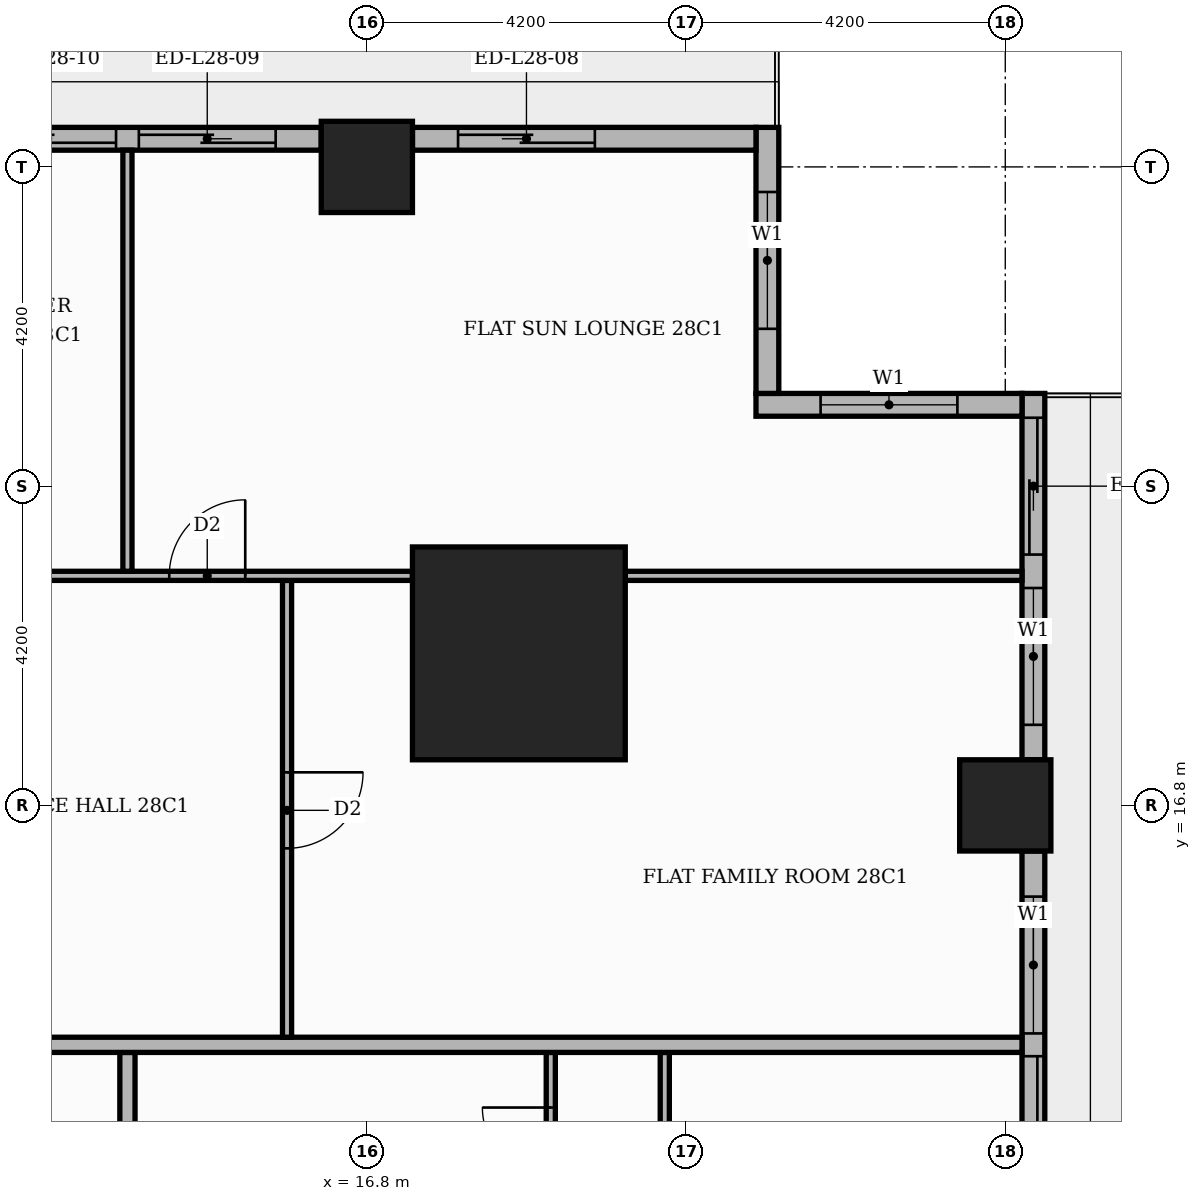
"""IFC4 building model, lengths in metres.
Left out: names, types, materials, properties, quantities, classifications, styles, units other than length and angle.
Written with IfcOpenShell. Run it as: python <this file> out.ifc"""

import sys

from ifc_helpers import new_model, si_unit, direction, frame, frame_2d, origin, origin_2d, place, context, subcontext, project, spatial, rectangle, extrude, element, fill, save


model = new_model("IFC4")
c1 = context("Model", 3, precision=1e-05, world=origin(), true_north=direction((0.0, 1.0)))
c2 = subcontext(c1, "Body", "Model", "MODEL_VIEW")
j1 = project(units=[si_unit("LENGTHUNIT", "METRE"), si_unit("PLANEANGLEUNIT", "RADIAN")], contexts=[c1])
p1 = place(None, origin())
s1 = spatial("IfcSite", under=j1, at=p1, CompositionType="ELEMENT")
p2 = place(p1, origin())
s2 = spatial("IfcBuilding", under=s1, at=p2, CompositionType="ELEMENT")
p3 = place(p2, frame((0.0, 0.0, 118.2)))
s3 = spatial("IfcBuildingStorey", under=s2, at=p3, CompositionType="ELEMENT", Elevation=118.2)
p4 = place(p3, frame((18.8, 18.8, 0.0), z_axis=(0.0, 0.0, 1.0), x_axis=(1.0, 0.0, 0.0)))
e1 = element("IfcColumn", 1, at=p4, inside=s3, PredefinedType="COLUMN", context=c2, shape_type="SweptSolid", body=[
    extrude(rectangle(XDim=2.8, YDim=2.8, at=origin_2d()), origin(), (0.0, 0.0, 1.0), 3.9),
])
for number, where, z_axis, x_axis in (
    (2, (25.2, 16.8, 0.0), (0.0, 0.0, 1.0), (1.0, 0.0, 0.0)),
    (3, (16.8, 25.2, 0.0), (0.0, 0.0, 1.0), (1.0, 0.0, 0.0)),
):
    element("IfcColumn", number, at=place(p3, frame(where, z_axis=z_axis, x_axis=x_axis)), inside=s3, PredefinedType="COLUMN", context=c2, shape_type="SweptSolid", body=[
        extrude(rectangle(XDim=1.2, YDim=1.2, at=origin_2d()), origin(), (0.0, 0.0, 1.0), 3.9),
    ])
p5 = place(p3, frame((25.57, 9.0, 0.0), z_axis=(0.0, 0.0, 1.0), x_axis=(0.0, 1.0, 0.0)))
e4 = element("IfcWall", 4, at=p5, inside=s3, PredefinedType="STANDARD", context=c2, shape_type="SweptSolid", body=[
    extrude(rectangle(XDim=7.2, YDim=0.3, at=frame_2d((3.6, 0.0))), origin(), (0.0, 0.0, 1.0), 3.48),
])
p6 = place(p5, frame((0.6, 0.0, 0.0)))
e5 = element("IfcOpeningElement", 5, at=p6, cuts=e4, PredefinedType="OPENING", context=c2, shape_type="SweptSolid", body=[
    extrude(rectangle(XDim=3.9, YDim=2.4, at=frame_2d((1.95, 1.2))), frame((0.0, 0.16, 0.0), z_axis=(0.0, -1.0, 0.0), x_axis=(1.0, 0.0, 0.0)), (0.0, 0.0, 1.0), 0.32),
])
p7 = place(p5, frame((4.8, 0.0, 0.9)))
e6 = element("IfcOpeningElement", 6, at=p7, cuts=e4, PredefinedType="OPENING", context=c2, shape_type="SweptSolid", body=[
    extrude(rectangle(XDim=1.8, YDim=2.1, at=frame_2d((0.9, 1.05))), frame((0.0, 0.16, 0.0), z_axis=(0.0, -1.0, 0.0), x_axis=(1.0, 0.0, 0.0)), (0.0, 0.0, 1.0), 0.32),
])
p8 = place(p3, frame((25.57, 17.4, 0.0), z_axis=(0.0, 0.0, 1.0), x_axis=(0.0, 1.0, 0.0)))
e7 = element("IfcWall", 7, at=p8, inside=s3, PredefinedType="STANDARD", context=c2, shape_type="SweptSolid", body=[
    extrude(rectangle(XDim=4.82, YDim=0.3, at=frame_2d((2.41, 0.0))), origin(), (0.0, 0.0, 1.0), 3.48),
])
p9 = place(p8, frame((2.7, 0.0, 0.0)))
e8 = element("IfcOpeningElement", 8, at=p9, cuts=e7, PredefinedType="OPENING", context=c2, shape_type="SweptSolid", body=[
    extrude(rectangle(XDim=1.8, YDim=2.4, at=frame_2d((0.9, 1.2))), frame((0.0, 0.16, 0.0), z_axis=(0.0, -1.0, 0.0), x_axis=(1.0, 0.0, 0.0)), (0.0, 0.0, 1.0), 0.32),
])
p10 = place(p8, frame((0.46, 0.0, 0.9)))
e9 = element("IfcOpeningElement", 9, at=p10, cuts=e7, PredefinedType="OPENING", context=c2, shape_type="SweptSolid", body=[
    extrude(rectangle(XDim=1.8, YDim=2.1, at=frame_2d((0.9, 1.05))), frame((0.0, 0.16, 0.0), z_axis=(0.0, -1.0, 0.0), x_axis=(1.0, 0.0, 0.0)), (0.0, 0.0, 1.0), 0.32),
])
p11 = place(p3, frame((25.42, 22.07, 0.0), z_axis=(0.0, 0.0, 1.0), x_axis=(-1.0, 0.0, 0.0)))
e10 = element("IfcWall", 10, at=p11, inside=s3, PredefinedType="STANDARD", context=c2, shape_type="SweptSolid", body=[
    extrude(rectangle(XDim=3.5, YDim=0.3, at=frame_2d((1.75, 0.0))), origin(), (0.0, 0.0, 1.0), 3.48),
])
p12 = place(p11, frame((0.85, 0.0, 0.9)))
e11 = element("IfcOpeningElement", 11, at=p12, cuts=e10, PredefinedType="OPENING", context=c2, shape_type="SweptSolid", body=[
    extrude(rectangle(XDim=1.8, YDim=2.1, at=frame_2d((0.9, 1.05))), frame((0.0, 0.16, 0.0), z_axis=(0.0, -1.0, 0.0), x_axis=(1.0, 0.0, 0.0)), (0.0, 0.0, 1.0), 0.32),
])
p13 = place(p3, frame((22.07, 22.22, 0.0), z_axis=(0.0, 0.0, 1.0), x_axis=(0.0, 1.0, 0.0)))
e12 = element("IfcWall", 12, at=p13, inside=s3, PredefinedType="STANDARD", context=c2, shape_type="SweptSolid", body=[
    extrude(rectangle(XDim=3.5, YDim=0.3, at=frame_2d((1.75, 0.0))), origin(), (0.0, 0.0, 1.0), 3.48),
])
p14 = place(p13, frame((0.85, 0.0, 0.9)))
e13 = element("IfcOpeningElement", 13, at=p14, cuts=e12, PredefinedType="OPENING", context=c2, shape_type="SweptSolid", body=[
    extrude(rectangle(XDim=1.8, YDim=2.1, at=frame_2d((0.9, 1.05))), frame((0.0, 0.16, 0.0), z_axis=(0.0, -1.0, 0.0), x_axis=(1.0, 0.0, 0.0)), (0.0, 0.0, 1.0), 0.32),
])
p15 = place(p3, frame((21.92, 25.57, 0.0), z_axis=(0.0, 0.0, 1.0), x_axis=(-1.0, 0.0, 0.0)))
e14 = element("IfcWall", 14, at=p15, inside=s3, PredefinedType="STANDARD", context=c2, shape_type="SweptSolid", body=[
    extrude(rectangle(XDim=4.52, YDim=0.3, at=frame_2d((2.26, 0.0))), origin(), (0.0, 0.0, 1.0), 3.48),
])
p16 = place(p15, frame((2.12, 0.0, 0.0)))
e15 = element("IfcOpeningElement", 15, at=p16, cuts=e14, PredefinedType="OPENING", context=c2, shape_type="SweptSolid", body=[
    extrude(rectangle(XDim=1.8, YDim=2.4, at=frame_2d((0.9, 1.2))), frame((0.0, 0.16, 0.0), z_axis=(0.0, -1.0, 0.0), x_axis=(1.0, 0.0, 0.0)), (0.0, 0.0, 1.0), 0.32),
])
p17 = place(p3, frame((16.2, 25.57, 0.0), z_axis=(0.0, 0.0, 1.0), x_axis=(-1.0, 0.0, 0.0)))
e16 = element("IfcWall", 16, at=p17, inside=s3, PredefinedType="STANDARD", context=c2, shape_type="SweptSolid", body=[
    extrude(rectangle(XDim=7.2, YDim=0.3, at=frame_2d((3.6, 0.0))), origin(), (0.0, 0.0, 1.0), 3.48),
])
p18 = place(p17, frame((0.6, 0.0, 0.0)))
e17 = element("IfcOpeningElement", 17, at=p18, cuts=e16, PredefinedType="OPENING", context=c2, shape_type="SweptSolid", body=[
    extrude(rectangle(XDim=1.8, YDim=2.4, at=frame_2d((0.9, 1.2))), frame((0.0, 0.16, 0.0), z_axis=(0.0, -1.0, 0.0), x_axis=(1.0, 0.0, 0.0)), (0.0, 0.0, 1.0), 0.32),
])
p19 = place(p17, frame((2.7, 0.0, 0.0)))
e18 = element("IfcOpeningElement", 18, at=p19, cuts=e16, PredefinedType="OPENING", context=c2, shape_type="SweptSolid", body=[
    extrude(rectangle(XDim=1.8, YDim=2.4, at=frame_2d((0.9, 1.2))), frame((0.0, 0.16, 0.0), z_axis=(0.0, -1.0, 0.0), x_axis=(1.0, 0.0, 0.0)), (0.0, 0.0, 1.0), 0.32),
])
p20 = place(p17, frame((4.8, 0.0, 0.9)))
e19 = element("IfcOpeningElement", 19, at=p20, cuts=e16, PredefinedType="OPENING", context=c2, shape_type="SweptSolid", body=[
    extrude(rectangle(XDim=1.8, YDim=2.1, at=frame_2d((0.9, 1.05))), frame((0.0, 0.16, 0.0), z_axis=(0.0, -1.0, 0.0), x_axis=(1.0, 0.0, 0.0)), (0.0, 0.0, 1.0), 0.32),
])
p21 = place(p3, frame((13.65, -5.15, 0.0), z_axis=(0.0, 0.0, 1.0), x_axis=(0.0, 1.0, 0.0)))
e20 = element("IfcWall", 20, at=p21, inside=s3, PredefinedType="PARTITIONING", context=c2, shape_type="SweptSolid", body=[
    extrude(rectangle(XDim=18.7, YDim=0.2, at=frame_2d((9.35, 0.0))), origin(), (0.0, 0.0, 1.0), 3.48),
])
p22 = place(p21, frame((1.45, 0.0, 0.0)))
e21 = element("IfcOpeningElement", 21, at=p22, cuts=e20, PredefinedType="OPENING", context=c2, shape_type="SweptSolid", body=[
    extrude(rectangle(XDim=1.1, YDim=2.4, at=frame_2d((0.55, 1.2))), frame((0.0, 0.11, 0.0), z_axis=(0.0, -1.0, 0.0), x_axis=(1.0, 0.0, 0.0)), (0.0, 0.0, 1.0), 0.22),
])
p23 = place(p3, frame((20.72, 7.41, 0.0), z_axis=(0.0, 0.0, 1.0), x_axis=(0.0, 1.0, 0.0)))
e22 = element("IfcWall", 22, at=p23, inside=s3, PredefinedType="PARTITIONING", context=c2, shape_type="SweptSolid", body=[
    extrude(rectangle(XDim=6.14, YDim=0.12, at=frame_2d((3.07, 0.0))), origin(), (0.0, 0.0, 1.0), 3.48),
])
p24 = place(p23, frame((2.59, 0.0, 0.0)))
e23 = element("IfcOpeningElement", 23, at=p24, cuts=e22, PredefinedType="OPENING", context=c2, shape_type="SweptSolid", body=[
    extrude(rectangle(XDim=1.0, YDim=2.1, at=frame_2d((0.5, 1.05))), frame((0.0, 0.07, 0.0), z_axis=(0.0, -1.0, 0.0), x_axis=(1.0, 0.0, 0.0)), (0.0, 0.0, 1.0), 0.14),
])
p25 = place(p3, frame((19.22, 11.16, 0.0), z_axis=(0.0, 0.0, 1.0), x_axis=(0.0, 1.0, 0.0)))
e24 = element("IfcWall", 24, at=p25, inside=s3, PredefinedType="PARTITIONING", context=c2, shape_type="SweptSolid", body=[
    extrude(rectangle(XDim=2.39, YDim=0.12, at=frame_2d((1.195, 0.0))), origin(), (0.0, 0.0, 1.0), 3.48),
])
p26 = place(p25, frame((0.765, 0.0, 0.0)))
e25 = element("IfcOpeningElement", 25, at=p26, cuts=e24, PredefinedType="OPENING", context=c2, shape_type="SweptSolid", body=[
    extrude(rectangle(XDim=0.9, YDim=2.1, at=frame_2d((0.45, 1.05))), frame((0.0, 0.07, 0.0), z_axis=(0.0, -1.0, 0.0), x_axis=(1.0, 0.0, 0.0)), (0.0, 0.0, 1.0), 0.14),
])
p27 = place(p3, frame((-13.65, 13.65, 0.0), z_axis=(0.0, 0.0, 1.0), x_axis=(1.0, 0.0, 0.0)))
e26 = element("IfcWall", 26, at=p27, inside=s3, PredefinedType="PARTITIONING", context=c2, shape_type="SweptSolid", body=[
    extrude(rectangle(XDim=39.07, YDim=0.2, at=frame_2d((19.535, 0.0))), origin(), (0.0, 0.0, 1.0), 3.48),
])
p28 = place(p27, frame((24.65, 0.0, 0.0)))
e27 = element("IfcOpeningElement", 27, at=p28, cuts=e26, PredefinedType="OPENING", context=c2, shape_type="SweptSolid", body=[
    extrude(rectangle(XDim=1.1, YDim=2.4, at=frame_2d((0.55, 1.2))), frame((0.0, 0.11, 0.0), z_axis=(0.0, -1.0, 0.0), x_axis=(1.0, 0.0, 0.0)), (0.0, 0.0, 1.0), 0.22),
])
p29 = place(p27, frame((14.15, 0.0, 0.0)))
e28 = element("IfcOpeningElement", 28, at=p29, cuts=e26, PredefinedType="OPENING", context=c2, shape_type="SweptSolid", body=[
    extrude(rectangle(XDim=1.1, YDim=2.4, at=frame_2d((0.55, 1.2))), frame((0.0, 0.11, 0.0), z_axis=(0.0, -1.0, 0.0), x_axis=(1.0, 0.0, 0.0)), (0.0, 0.0, 1.0), 0.22),
])
p30 = place(p3, frame((15.75, 13.75, 0.0), z_axis=(0.0, 0.0, 1.0), x_axis=(0.0, 1.0, 0.0)))
e29 = element("IfcWall", 29, at=p30, inside=s3, PredefinedType="PARTITIONING", context=c2, shape_type="SweptSolid", body=[
    extrude(rectangle(XDim=6.01, YDim=0.12, at=frame_2d((3.005, 0.0))), origin(), (0.0, 0.0, 1.0), 3.48),
])
p31 = place(p30, frame((2.485, 0.0, 0.0)))
e30 = element("IfcOpeningElement", 30, at=p31, cuts=e29, PredefinedType="OPENING", context=c2, shape_type="SweptSolid", body=[
    extrude(rectangle(XDim=1.0, YDim=2.1, at=frame_2d((0.5, 1.05))), frame((0.0, 0.07, 0.0), z_axis=(0.0, -1.0, 0.0), x_axis=(1.0, 0.0, 0.0)), (0.0, 0.0, 1.0), 0.14),
])
p32 = place(p3, frame((5.35, 19.82, 0.0), z_axis=(0.0, 0.0, 1.0), x_axis=(1.0, 0.0, 0.0)))
e31 = element("IfcWall", 31, at=p32, inside=s3, PredefinedType="PARTITIONING", context=c2, shape_type="SweptSolid", body=[
    extrude(rectangle(XDim=12.05, YDim=0.12, at=frame_2d((6.025, 0.0))), origin(), (0.0, 0.0, 1.0), 3.48),
])
p33 = place(p32, frame((8.85, 0.0, 0.0)))
e32 = element("IfcOpeningElement", 32, at=p33, cuts=e31, PredefinedType="OPENING", context=c2, shape_type="SweptSolid", body=[
    extrude(rectangle(XDim=1.0, YDim=2.1, at=frame_2d((0.5, 1.05))), frame((0.0, 0.07, 0.0), z_axis=(0.0, -1.0, 0.0), x_axis=(1.0, 0.0, 0.0)), (0.0, 0.0, 1.0), 0.14),
])
p34 = place(p32, frame((5.75, 0.0, 0.0)))
e33 = element("IfcOpeningElement", 33, at=p34, cuts=e31, PredefinedType="OPENING", context=c2, shape_type="SweptSolid", body=[
    extrude(rectangle(XDim=0.9, YDim=2.1, at=frame_2d((0.45, 1.05))), frame((0.0, 0.07, 0.0), z_axis=(0.0, -1.0, 0.0), x_axis=(1.0, 0.0, 0.0)), (0.0, 0.0, 1.0), 0.14),
])
p35 = place(p3, frame((20.2, 19.82, 0.0), z_axis=(0.0, 0.0, 1.0), x_axis=(1.0, 0.0, 0.0)))
e34 = element("IfcWall", 34, at=p35, inside=s3, PredefinedType="PARTITIONING", context=c2, shape_type="SweptSolid", body=[
    extrude(rectangle(XDim=5.22, YDim=0.12, at=frame_2d((2.61, 0.0))), origin(), (0.0, 0.0, 1.0), 3.48),
])
p36 = place(p3, frame((13.65, 19.88, 0.0), z_axis=(0.0, 0.0, 1.0), x_axis=(0.0, 1.0, 0.0)))
e35 = element("IfcWall", 35, at=p36, inside=s3, PredefinedType="PARTITIONING", context=c2, shape_type="SweptSolid", body=[
    extrude(rectangle(XDim=5.54, YDim=0.12, at=frame_2d((2.77, 0.0))), origin(), (0.0, 0.0, 1.0), 3.48),
])
p37 = place(p6, origin())
e36 = element("IfcDoor", 36, at=p37, inside=s3, OperationType="SLIDING_TO_LEFT", PredefinedType="DOOR", context=c2, shape_type="SweptSolid", body=[
    extrude(rectangle(XDim=3.9, YDim=2.4, at=frame_2d((1.95, 1.2))), frame((0.0, 0.025, 0.0), z_axis=(0.0, -1.0, 0.0), x_axis=(1.0, 0.0, 0.0)), (0.0, 0.0, 1.0), 0.05),
])
fill(e5, e36)
p38 = place(p7, origin())
e37 = element("IfcWindow", 37, at=p38, inside=s3, PartitioningType="SINGLE_PANEL", PredefinedType="WINDOW", context=c2, shape_type="SweptSolid", body=[
    extrude(rectangle(XDim=1.8, YDim=2.1, at=frame_2d((0.9, 1.05))), frame((0.0, 0.03, 0.0), z_axis=(0.0, -1.0, 0.0), x_axis=(1.0, 0.0, 0.0)), (0.0, 0.0, 1.0), 0.06),
])
fill(e6, e37)
p39 = place(p9, origin())
e38 = element("IfcDoor", 38, at=p39, inside=s3, OperationType="SLIDING_TO_LEFT", PredefinedType="DOOR", context=c2, shape_type="SweptSolid", body=[
    extrude(rectangle(XDim=1.8, YDim=2.4, at=frame_2d((0.9, 1.2))), frame((0.0, 0.025, 0.0), z_axis=(0.0, -1.0, 0.0), x_axis=(1.0, 0.0, 0.0)), (0.0, 0.0, 1.0), 0.05),
])
fill(e8, e38)
p40 = place(p10, origin())
e39 = element("IfcWindow", 39, at=p40, inside=s3, PartitioningType="SINGLE_PANEL", PredefinedType="WINDOW", context=c2, shape_type="SweptSolid", body=[
    extrude(rectangle(XDim=1.8, YDim=2.1, at=frame_2d((0.9, 1.05))), frame((0.0, 0.03, 0.0), z_axis=(0.0, -1.0, 0.0), x_axis=(1.0, 0.0, 0.0)), (0.0, 0.0, 1.0), 0.06),
])
fill(e9, e39)
p41 = place(p12, origin())
e40 = element("IfcWindow", 40, at=p41, inside=s3, PartitioningType="SINGLE_PANEL", PredefinedType="WINDOW", context=c2, shape_type="SweptSolid", body=[
    extrude(rectangle(XDim=1.8, YDim=2.1, at=frame_2d((0.9, 1.05))), frame((0.0, 0.03, 0.0), z_axis=(0.0, -1.0, 0.0), x_axis=(1.0, 0.0, 0.0)), (0.0, 0.0, 1.0), 0.06),
])
fill(e11, e40)
p42 = place(p14, origin())
e41 = element("IfcWindow", 41, at=p42, inside=s3, PartitioningType="SINGLE_PANEL", PredefinedType="WINDOW", context=c2, shape_type="SweptSolid", body=[
    extrude(rectangle(XDim=1.8, YDim=2.1, at=frame_2d((0.9, 1.05))), frame((0.0, 0.03, 0.0), z_axis=(0.0, -1.0, 0.0), x_axis=(1.0, 0.0, 0.0)), (0.0, 0.0, 1.0), 0.06),
])
fill(e13, e41)
p43 = place(p16, origin())
e42 = element("IfcDoor", 42, at=p43, inside=s3, OperationType="SLIDING_TO_RIGHT", PredefinedType="DOOR", context=c2, shape_type="SweptSolid", body=[
    extrude(rectangle(XDim=1.8, YDim=2.4, at=frame_2d((0.9, 1.2))), frame((0.0, 0.025, 0.0), z_axis=(0.0, -1.0, 0.0), x_axis=(1.0, 0.0, 0.0)), (0.0, 0.0, 1.0), 0.05),
])
fill(e15, e42)
p44 = place(p18, origin())
e43 = element("IfcDoor", 43, at=p44, inside=s3, OperationType="SLIDING_TO_LEFT", PredefinedType="DOOR", context=c2, shape_type="SweptSolid", body=[
    extrude(rectangle(XDim=1.8, YDim=2.4, at=frame_2d((0.9, 1.2))), frame((0.0, 0.025, 0.0), z_axis=(0.0, -1.0, 0.0), x_axis=(1.0, 0.0, 0.0)), (0.0, 0.0, 1.0), 0.05),
])
fill(e17, e43)
p45 = place(p19, origin())
e44 = element("IfcDoor", 44, at=p45, inside=s3, OperationType="SLIDING_TO_RIGHT", PredefinedType="DOOR", context=c2, shape_type="SweptSolid", body=[
    extrude(rectangle(XDim=1.8, YDim=2.4, at=frame_2d((0.9, 1.2))), frame((0.0, 0.025, 0.0), z_axis=(0.0, -1.0, 0.0), x_axis=(1.0, 0.0, 0.0)), (0.0, 0.0, 1.0), 0.05),
])
fill(e18, e44)
p46 = place(p26, origin())
e45 = element("IfcDoor", 45, at=p46, inside=s3, OperationType="SINGLE_SWING_RIGHT", PredefinedType="DOOR", context=c2, shape_type="SweptSolid", body=[
    extrude(rectangle(XDim=0.9, YDim=2.1, at=frame_2d((0.45, 1.05))), frame((0.0, 0.025, 0.0), z_axis=(0.0, -1.0, 0.0), x_axis=(1.0, 0.0, 0.0)), (0.0, 0.0, 1.0), 0.05),
])
fill(e25, e45)
p47 = place(p31, frame((1.0, 0.0, 0.0), z_axis=(0.0, 0.0, 1.0), x_axis=(-1.0, 0.0, 0.0)))
e46 = element("IfcDoor", 46, at=p47, inside=s3, OperationType="SINGLE_SWING_RIGHT", PredefinedType="DOOR", context=c2, shape_type="SweptSolid", body=[
    extrude(rectangle(XDim=1.0, YDim=2.1, at=frame_2d((0.5, 1.05))), frame((0.0, 0.025, 0.0), z_axis=(0.0, -1.0, 0.0), x_axis=(1.0, 0.0, 0.0)), (0.0, 0.0, 1.0), 0.05),
])
fill(e30, e46)
p48 = place(p33, origin())
e47 = element("IfcDoor", 47, at=p48, inside=s3, OperationType="SINGLE_SWING_RIGHT", PredefinedType="DOOR", context=c2, shape_type="SweptSolid", body=[
    extrude(rectangle(XDim=1.0, YDim=2.1, at=frame_2d((0.5, 1.05))), frame((0.0, 0.025, 0.0), z_axis=(0.0, -1.0, 0.0), x_axis=(1.0, 0.0, 0.0)), (0.0, 0.0, 1.0), 0.05),
])
fill(e32, e47)
save(model, sys.argv[1])
